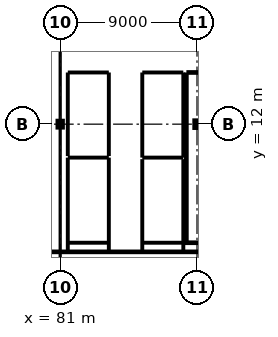
"""IFC4 building model, lengths in metres.
Left out: names, types, materials, properties, quantities, classifications, styles, units other than length and angle.
Written with IfcOpenShell. Run it as: python <this file> out.ifc"""

import sys

from ifc_helpers import new_model, si_unit, direction, frame, frame_2d, origin, origin_2d, place, context, subcontext, project, spatial, rectangle, i_section, extrude, element, fill, save


model = new_model("IFC4")
c1 = context("Model", 3, precision=1e-05, world=origin(), true_north=direction((0.0, 1.0)))
c2 = subcontext(c1, "Body", "Model", "MODEL_VIEW")
j1 = project(units=[si_unit("LENGTHUNIT", "METRE"), si_unit("PLANEANGLEUNIT", "RADIAN")], contexts=[c1])
p1 = place(None, origin())
s1 = spatial("IfcSite", under=j1, at=p1, CompositionType="ELEMENT")
p2 = place(p1, origin())
s2 = spatial("IfcBuilding", under=s1, at=p2, CompositionType="ELEMENT")
p3 = place(p2, frame((0.0, 0.0, 9.9)))
s3 = spatial("IfcBuildingStorey", under=s2, at=p3, CompositionType="ELEMENT", Elevation=9.9)
p4 = place(p3, frame((81.0, 12.0, 0.0), z_axis=(0.0, 0.0, 1.0), x_axis=(1.0, 0.0, 0.0)))
e1 = element("IfcColumn", 1, at=p4, inside=s3, PredefinedType="COLUMN", context=c2, shape_type="SweptSolid", body=[
    extrude(i_section(OverallWidth=0.3, OverallDepth=0.4, WebThickness=0.013, FlangeThickness=0.024, at=origin_2d()), origin(), (0.0, 0.0, 1.0), 4.5),
])
p5 = place(p3, frame((90.0, 12.0, 0.0), z_axis=(0.0, 0.0, 1.0), x_axis=(1.0, 0.0, 0.0)))
e2 = element("IfcColumn", 2, at=p5, inside=s3, PredefinedType="COLUMN", context=c2, shape_type="SweptSolid", body=[
    extrude(i_section(OverallWidth=0.3, OverallDepth=0.45, WebThickness=0.014, FlangeThickness=0.026, at=origin_2d()), origin(), (0.0, 0.0, 1.0), 4.5),
])
p6 = place(p3, frame((46.08, 3.6, 0.0), z_axis=(0.0, 0.0, 1.0), x_axis=(1.0, 0.0, 0.0)))
e3 = element("IfcWall", 3, at=p6, inside=s3, PredefinedType="PARTITIONING", context=c2, shape_type="SweptSolid", body=[
    extrude(rectangle(XDim=71.04, YDim=0.15, at=frame_2d((35.52, 0.0))), origin(), (0.0, 0.0, 1.0), 4.14),
])
p7 = place(p6, frame((27.595, 0.0, 0.0)))
e4 = element("IfcOpeningElement", 4, at=p7, cuts=e3, PredefinedType="OPENING", context=c2, shape_type="SweptSolid", body=[
    extrude(rectangle(XDim=1.05, YDim=2.25, at=frame_2d((0.525, 1.125))), frame((0.0, 0.09, 0.0), z_axis=(0.0, -1.0, 0.0), x_axis=(1.0, 0.0, 0.0)), (0.0, 0.0, 1.0), 0.18),
])
p8 = place(p3, frame((84.2, 9.72, 0.0), z_axis=(0.0, 0.0, 1.0), x_axis=(0.0, -1.0, 0.0)))
e5 = element("IfcWall", 5, at=p8, inside=s3, PredefinedType="PARTITIONING", context=c2, shape_type="SweptSolid", body=[
    extrude(rectangle(XDim=6.05, YDim=0.1, at=frame_2d((3.025, 0.0))), origin(), (0.0, 0.0, 1.0), 4.14),
])
p9 = place(p8, frame((2.529, 0.0, 0.0)))
e6 = element("IfcOpeningElement", 6, at=p9, cuts=e5, PredefinedType="OPENING", context=c2, shape_type="SweptSolid", body=[
    extrude(rectangle(XDim=0.9, YDim=2.05, at=frame_2d((0.45, 1.025))), frame((0.0, 0.065, 0.0), z_axis=(0.0, -1.0, 0.0), x_axis=(1.0, 0.0, 0.0)), (0.0, 0.0, 1.0), 0.13),
])
p10 = place(p3, frame((84.155, 4.2, 0.0), z_axis=(0.0, 0.0, 1.0), x_axis=(-1.0, 0.0, 0.0)))
e7 = element("IfcWall", 7, at=p10, inside=s3, PredefinedType="PARTITIONING", context=c2, shape_type="SweptSolid", body=[
    extrude(rectangle(XDim=2.575, YDim=0.1, at=frame_2d((1.288, 0.0))), origin(), (0.0, 0.0, 1.0), 4.14),
])
p11 = place(p3, frame((81.5, 3.67, 0.0), z_axis=(0.0, 0.0, 1.0), x_axis=(0.0, 1.0, 0.0)))
e8 = element("IfcWall", 8, at=p11, inside=s3, PredefinedType="PARTITIONING", context=c2, shape_type="SweptSolid", body=[
    extrude(rectangle(XDim=6.05, YDim=0.1, at=frame_2d((3.025, 0.0))), origin(), (0.0, 0.0, 1.0), 3.695),
])
p12 = place(p3, frame((81.58, 9.8, 0.0), z_axis=(0.0, 0.0, 1.0), x_axis=(1.0, 0.0, 0.0)))
e9 = element("IfcWall", 9, at=p12, inside=s3, PredefinedType="PARTITIONING", context=c2, shape_type="SweptSolid", body=[
    extrude(rectangle(XDim=2.54, YDim=0.1, at=frame_2d((1.27, 0.0))), origin(), (0.0, 0.0, 1.0), 4.14),
])
p13 = place(p3, frame((81.5, 9.98, 0.0), z_axis=(0.0, 0.0, 1.0), x_axis=(0.0, 1.0, 0.0)))
e10 = element("IfcWall", 10, at=p13, inside=s3, PredefinedType="PARTITIONING", context=c2, shape_type="SweptSolid", body=[
    extrude(rectangle(XDim=5.34, YDim=0.1, at=frame_2d((2.67, 0.0))), origin(), (0.0, 0.0, 1.0), 3.695),
])
p14 = place(p3, frame((81.58, 15.4, 0.0), z_axis=(0.0, 0.0, 1.0), x_axis=(1.0, 0.0, 0.0)))
e11 = element("IfcWall", 11, at=p14, inside=s3, PredefinedType="PARTITIONING", context=c2, shape_type="SweptSolid", body=[
    extrude(rectangle(XDim=2.54, YDim=0.1, at=frame_2d((1.27, 0.0))), origin(), (0.0, 0.0, 1.0), 4.14),
])
p15 = place(p3, frame((84.2, 15.32, 0.0), z_axis=(0.0, 0.0, 1.0), x_axis=(0.0, -1.0, 0.0)))
e12 = element("IfcWall", 12, at=p15, inside=s3, PredefinedType="PARTITIONING", context=c2, shape_type="SweptSolid", body=[
    extrude(rectangle(XDim=5.34, YDim=0.1, at=frame_2d((2.67, 0.0))), origin(), (0.0, 0.0, 1.0), 4.14),
])
p16 = place(p15, frame((2.22, 0.0, 0.0)))
e13 = element("IfcOpeningElement", 13, at=p16, cuts=e12, PredefinedType="OPENING", context=c2, shape_type="SweptSolid", body=[
    extrude(rectangle(XDim=0.9, YDim=2.05, at=frame_2d((0.45, 1.025))), frame((0.0, 0.065, 0.0), z_axis=(0.0, -1.0, 0.0), x_axis=(1.0, 0.0, 0.0)), (0.0, 0.0, 1.0), 0.13),
])
p17 = place(p3, frame((86.4, 9.88, 0.0), z_axis=(0.0, 0.0, 1.0), x_axis=(0.0, 1.0, 0.0)))
e14 = element("IfcWall", 14, at=p17, inside=s3, PredefinedType="PARTITIONING", context=c2, shape_type="SweptSolid", body=[
    extrude(rectangle(XDim=5.44, YDim=0.1, at=frame_2d((2.72, 0.0))), origin(), (0.0, 0.0, 1.0), 4.14),
])
p18 = place(p17, frame((2.22, 0.0, 0.0)))
e15 = element("IfcOpeningElement", 15, at=p18, cuts=e14, PredefinedType="OPENING", context=c2, shape_type="SweptSolid", body=[
    extrude(rectangle(XDim=1.0, YDim=2.1, at=frame_2d((0.5, 1.05))), frame((0.0, 0.065, 0.0), z_axis=(0.0, -1.0, 0.0), x_axis=(1.0, 0.0, 0.0)), (0.0, 0.0, 1.0), 0.13),
])
p19 = place(p3, frame((86.48, 15.4, 0.0), z_axis=(0.0, 0.0, 1.0), x_axis=(1.0, 0.0, 0.0)))
e16 = element("IfcWall", 16, at=p19, inside=s3, PredefinedType="PARTITIONING", context=c2, shape_type="SweptSolid", body=[
    extrude(rectangle(XDim=2.54, YDim=0.1, at=frame_2d((1.27, 0.0))), origin(), (0.0, 0.0, 1.0), 4.14),
])
p20 = place(p3, frame((89.1, 15.32, 0.0), z_axis=(0.0, 0.0, 1.0), x_axis=(0.0, -1.0, 0.0)))
e17 = element("IfcWall", 17, at=p20, inside=s3, PredefinedType="PARTITIONING", context=c2, shape_type="SweptSolid", body=[
    extrude(rectangle(XDim=5.44, YDim=0.1, at=frame_2d((2.72, 0.0))), origin(), (0.0, 0.0, 1.0), 4.14),
])
p21 = place(p3, frame((89.02, 9.8, 0.0), z_axis=(0.0, 0.0, 1.0), x_axis=(-1.0, 0.0, 0.0)))
e18 = element("IfcWall", 18, at=p21, inside=s3, PredefinedType="PARTITIONING", context=c2, shape_type="SweptSolid", body=[
    extrude(rectangle(XDim=2.54, YDim=0.1, at=frame_2d((1.27, 0.0))), origin(), (0.0, 0.0, 1.0), 4.14),
])
p22 = place(p3, frame((89.1, 9.62, 0.0), z_axis=(0.0, 0.0, 1.0), x_axis=(0.0, -1.0, 0.0)))
e19 = element("IfcWall", 19, at=p22, inside=s3, PredefinedType="PARTITIONING", context=c2, shape_type="SweptSolid", body=[
    extrude(rectangle(XDim=5.95, YDim=0.1, at=frame_2d((2.975, 0.0))), origin(), (0.0, 0.0, 1.0), 4.14),
])
p23 = place(p3, frame((89.055, 4.2, 0.0), z_axis=(0.0, 0.0, 1.0), x_axis=(-1.0, 0.0, 0.0)))
e20 = element("IfcWall", 20, at=p23, inside=s3, PredefinedType="PARTITIONING", context=c2, shape_type="SweptSolid", body=[
    extrude(rectangle(XDim=2.575, YDim=0.1, at=frame_2d((1.288, 0.0))), origin(), (0.0, 0.0, 1.0), 4.14),
])
p24 = place(p3, frame((86.4, 3.67, 0.0), z_axis=(0.0, 0.0, 1.0), x_axis=(0.0, 1.0, 0.0)))
e21 = element("IfcWall", 21, at=p24, inside=s3, PredefinedType="PARTITIONING", context=c2, shape_type="SweptSolid", body=[
    extrude(rectangle(XDim=5.95, YDim=0.1, at=frame_2d((2.975, 0.0))), origin(), (0.0, 0.0, 1.0), 4.14),
])
p25 = place(p24, frame((2.571, 0.0, 0.0)))
e22 = element("IfcOpeningElement", 22, at=p25, cuts=e21, PredefinedType="OPENING", context=c2, shape_type="SweptSolid", body=[
    extrude(rectangle(XDim=0.9, YDim=2.05, at=frame_2d((0.45, 1.025))), frame((0.0, 0.065, 0.0), z_axis=(0.0, -1.0, 0.0), x_axis=(1.0, 0.0, 0.0)), (0.0, 0.0, 1.0), 0.13),
])
p26 = place(p3, frame((107.53, 4.2, 0.0), z_axis=(0.0, 0.0, 1.0), x_axis=(-1.0, 0.0, 0.0)))
e23 = element("IfcWall", 23, at=p26, inside=s3, PredefinedType="PARTITIONING", context=c2, shape_type="SweptSolid", body=[
    extrude(rectangle(XDim=18.385, YDim=0.15, at=frame_2d((9.192, 0.0))), origin(), (0.0, 0.0, 1.0), 4.14),
])
p27 = place(p3, frame((89.3, 4.27, 0.0), z_axis=(0.0, 0.0, 1.0), x_axis=(0.0, 1.0, 0.0)))
e24 = element("IfcWall", 24, at=p27, inside=s3, PredefinedType="PARTITIONING", context=c2, shape_type="SweptSolid", body=[
    extrude(rectangle(XDim=11.05, YDim=0.15, at=frame_2d((5.525, 0.0))), origin(), (0.0, 0.0, 1.0), 4.14),
])
p28 = place(p3, frame((89.38, 15.4, 0.0), z_axis=(0.0, 0.0, 1.0), x_axis=(1.0, 0.0, 0.0)))
e25 = element("IfcWall", 25, at=p28, inside=s3, PredefinedType="PARTITIONING", context=c2, shape_type="SweptSolid", body=[
    extrude(rectangle(XDim=18.14, YDim=0.15, at=frame_2d((9.07, 0.0))), origin(), (0.0, 0.0, 1.0), 4.14),
])
p29 = place(p28, frame((8.545, 0.0, 0.0)))
e26 = element("IfcOpeningElement", 26, at=p29, cuts=e25, PredefinedType="OPENING", context=c2, shape_type="SweptSolid", body=[
    extrude(rectangle(XDim=1.05, YDim=2.25, at=frame_2d((0.525, 1.125))), frame((0.0, 0.09, 0.0), z_axis=(0.0, -1.0, 0.0), x_axis=(1.0, 0.0, 0.0)), (0.0, 0.0, 1.0), 0.18),
])
p30 = place(p9, origin())
e27 = element("IfcDoor", 27, at=p30, inside=s3, OperationType="SINGLE_SWING_LEFT", PredefinedType="DOOR", context=c2, shape_type="SweptSolid", body=[
    extrude(rectangle(XDim=0.9, YDim=2.05, at=frame_2d((0.45, 1.025))), frame((0.0, 0.025, 0.0), z_axis=(0.0, -1.0, 0.0), x_axis=(1.0, 0.0, 0.0)), (0.0, 0.0, 1.0), 0.05),
])
fill(e6, e27)
p31 = place(p16, frame((0.9, 0.0, 0.0), z_axis=(0.0, 0.0, 1.0), x_axis=(-1.0, 0.0, 0.0)))
e28 = element("IfcDoor", 28, at=p31, inside=s3, OperationType="SINGLE_SWING_RIGHT", PredefinedType="DOOR", context=c2, shape_type="SweptSolid", body=[
    extrude(rectangle(XDim=0.9, YDim=2.05, at=frame_2d((0.45, 1.025))), frame((0.0, 0.025, 0.0), z_axis=(0.0, -1.0, 0.0), x_axis=(1.0, 0.0, 0.0)), (0.0, 0.0, 1.0), 0.05),
])
fill(e13, e28)
p32 = place(p18, origin())
e29 = element("IfcDoor", 29, at=p32, inside=s3, OperationType="SINGLE_SWING_LEFT", PredefinedType="DOOR", context=c2, shape_type="SweptSolid", body=[
    extrude(rectangle(XDim=1.0, YDim=2.1, at=frame_2d((0.5, 1.05))), frame((0.0, 0.025, 0.0), z_axis=(0.0, -1.0, 0.0), x_axis=(1.0, 0.0, 0.0)), (0.0, 0.0, 1.0), 0.05),
])
fill(e15, e29)
p33 = place(p25, frame((0.9, 0.0, 0.0), z_axis=(0.0, 0.0, 1.0), x_axis=(-1.0, 0.0, 0.0)))
e30 = element("IfcDoor", 30, at=p33, inside=s3, OperationType="SINGLE_SWING_RIGHT", PredefinedType="DOOR", context=c2, shape_type="SweptSolid", body=[
    extrude(rectangle(XDim=0.9, YDim=2.05, at=frame_2d((0.45, 1.025))), frame((0.0, 0.025, 0.0), z_axis=(0.0, -1.0, 0.0), x_axis=(1.0, 0.0, 0.0)), (0.0, 0.0, 1.0), 0.05),
])
fill(e22, e30)
save(model, sys.argv[1])
